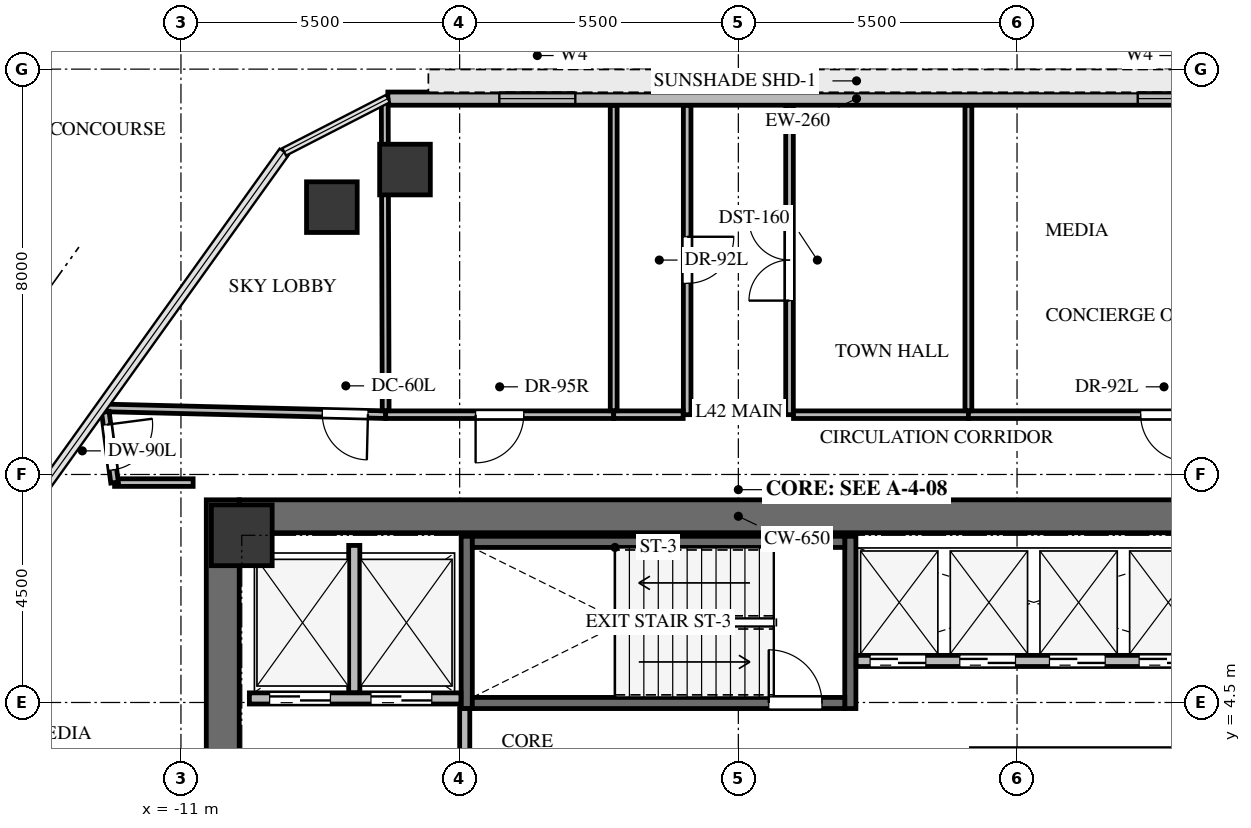
"""IFC4 building model, lengths in metres.
Left out: names, types, materials, properties, quantities, classifications, styles, units other than length and angle.
Written with IfcOpenShell. Run it as: python <this file> out.ifc"""

import sys

from ifc_helpers import new_model, si_unit, direction, frame, frame_2d, origin, origin_2d, place, context, subcontext, project, spatial, rectangle, extrude, source, transform, mapped, element, fill, save


model = new_model("IFC4")
c1 = context("Model", 3, precision=1e-05, world=origin(), true_north=direction((0.0, 1.0)))
c2 = subcontext(c1, "Body", "Model", "MODEL_VIEW")
j1 = project(units=[si_unit("LENGTHUNIT", "METRE"), si_unit("PLANEANGLEUNIT", "RADIAN")], contexts=[c1])
p1 = place(None, origin())
s1 = spatial("IfcSite", under=j1, at=p1, CompositionType="ELEMENT")
p2 = place(p1, origin())
s2 = spatial("IfcBuilding", under=s1, at=p2, CompositionType="ELEMENT")
p3 = place(p2, frame((0.0, 0.0, 155.1)))
s3 = spatial("IfcBuildingStorey", under=s2, at=p3, CompositionType="ELEMENT", Elevation=155.1)
p4 = place(p3, frame((-10.175, -8.5, 0.0), z_axis=(0.0, 0.0, 1.0), x_axis=(0.0, 1.0, 0.0)))
e1 = element("IfcWall", 1, at=p4, inside=s3, PredefinedType="SHEAR", context=c2, shape_type="SweptSolid", body=[
    extrude(rectangle(XDim=17.0, YDim=0.65, at=frame_2d((8.5, 0.0))), origin(), (0.0, 0.0, 1.0), 4.2),
])
p5 = place(p3, frame((-9.85, 8.175, 0.0), z_axis=(0.0, 0.0, 1.0), x_axis=(1.0, 0.0, 0.0)))
e2 = element("IfcWall", 2, at=p5, inside=s3, PredefinedType="SHEAR", context=c2, shape_type="SweptSolid", body=[
    extrude(rectangle(XDim=19.7, YDim=0.65, at=frame_2d((9.85, 0.0))), origin(), (0.0, 0.0, 1.0), 4.2),
])
for number, where, z_axis, x_axis in (
    (3, (2.21, 4.38, -0.32), (0.0, 0.0, 1.0), (0.0, 1.0, 0.0)),
    (4, (-5.36, 7.78, -0.32), (0.0, 0.0, 1.0), (0.0, -1.0, 0.0)),
):
    element("IfcWall", number, at=place(p3, frame(where, z_axis=z_axis, x_axis=x_axis)), inside=s3, PredefinedType="SHEAR", context=c2, shape_type="SweptSolid", body=[
        extrude(rectangle(XDim=3.4, YDim=0.22, at=frame_2d((1.7, 0.0))), origin(), (0.0, 0.0, 1.0), 4.28),
    ])
p6 = place(p3, frame((-5.25, 4.49, -0.32), z_axis=(0.0, 0.0, 1.0), x_axis=(1.0, 0.0, 0.0)))
e5 = element("IfcWall", 5, at=p6, inside=s3, PredefinedType="SHEAR", context=c2, shape_type="SweptSolid", body=[
    extrude(rectangle(XDim=7.35, YDim=0.22, at=frame_2d((3.675, 0.0))), origin(), (0.0, 0.0, 1.0), 4.28),
])
p7 = place(p6, frame((5.85, 0.0, 0.0)))
e6 = element("IfcOpeningElement", 6, at=p7, cuts=e5, PredefinedType="OPENING", context=c2, shape_type="SweptSolid", body=[
    extrude(rectangle(XDim=1.05, YDim=2.15, at=frame_2d((0.525, 1.075))), frame((0.0, 0.12, 0.0), z_axis=(0.0, -1.0, 0.0), x_axis=(1.0, 0.0, 0.0)), (0.0, 0.0, 1.0), 0.24),
])
p8 = place(p3, frame((2.1, 7.67, -0.32), z_axis=(0.0, 0.0, 1.0), x_axis=(-1.0, 0.0, 0.0)))
e7 = element("IfcWall", 7, at=p8, inside=s3, PredefinedType="SHEAR", context=c2, shape_type="SweptSolid", body=[
    extrude(rectangle(XDim=7.35, YDim=0.22, at=frame_2d((3.675, 0.0))), origin(), (0.0, 0.0, 1.0), 4.28),
])
m1 = source(origin(), c2, "Body", "SweptSolid", [
    extrude(rectangle(XDim=1.2, YDim=1.2, at=origin_2d()), origin(), (0.0, 0.0, 1.0), 4.28),
])
p9 = place(p3, frame((-9.8, 7.8, -0.32), z_axis=(0.0, 0.0, 1.0), x_axis=(1.0, 0.0, 0.0)))
e8 = element("IfcColumn", 8, at=p9, inside=s3, PredefinedType="COLUMN", context=c2, shape_type="MappedRepresentation", body=[
    mapped(m1, transform((0.0, 0.0, 0.0), x_axis=(1.0, 0.0, 0.0), y_axis=(0.0, 1.0, 0.0), z_axis=(0.0, 0.0, 1.0), scale=1.0)),
])
m2 = source(origin(), c2, "Body", "SweptSolid", [
    extrude(rectangle(XDim=1.0, YDim=1.0, at=origin_2d()), origin(), (0.0, 0.0, 1.0), 4.28),
])
for number, where, z_axis, x_axis in (
    (9, (-8.022, 14.276, -0.32), (0.0, 0.0, 1.0), (1.0, 0.0, 0.0)),
    (10, (-6.579, 15.018, -0.32), (0.0, 0.0, 1.0), (1.0, 0.0, 0.0)),
):
    element("IfcColumn", number, at=place(p3, frame(where, z_axis=z_axis, x_axis=x_axis)), inside=s3, PredefinedType="COLUMN", context=c2, shape_type="MappedRepresentation", body=[
        mapped(m2, transform((0.0, 0.0, 0.0), x_axis=(1.0, 0.0, 0.0), y_axis=(0.0, 1.0, 0.0), z_axis=(0.0, 0.0, 1.0), scale=1.0)),
    ])
p10 = place(p3, frame((-6.917, 16.418, 0.0), z_axis=(0.0, 0.0, 1.0), x_axis=(1.0, 0.0, 0.0)))
e11 = element("IfcWall", 11, at=p10, inside=s3, PredefinedType="SOLIDWALL", context=c2, shape_type="SweptSolid", body=[
    extrude(rectangle(XDim=18.499, YDim=0.26, at=frame_2d((9.249, 0.0))), origin(), (0.0, 0.0, 1.0), 3.96),
])
p11 = place(p10, frame((2.2, 0.0, 0.9)))
e12 = element("IfcOpeningElement", 12, at=p11, cuts=e11, PredefinedType="OPENING", context=c2, shape_type="SweptSolid", body=[
    extrude(rectangle(XDim=1.5, YDim=1.6, at=frame_2d((0.75, 0.8))), frame((0.0, 0.14, 0.0), z_axis=(0.0, -1.0, 0.0), x_axis=(1.0, 0.0, 0.0)), (0.0, 0.0, 1.0), 0.28),
])
p12 = place(p10, frame((14.799, 0.0, 0.9)))
e13 = element("IfcOpeningElement", 13, at=p12, cuts=e11, PredefinedType="OPENING", context=c2, shape_type="SweptSolid", body=[
    extrude(rectangle(XDim=1.5, YDim=1.6, at=frame_2d((0.75, 0.8))), frame((0.0, 0.14, 0.0), z_axis=(0.0, -1.0, 0.0), x_axis=(1.0, 0.0, 0.0)), (0.0, 0.0, 1.0), 0.28),
])
p13 = place(p3, frame((-9.65, 4.58, 0.0), z_axis=(0.0, 0.0, 1.0), x_axis=(1.0, 0.0, 0.0)))
e14 = element("IfcWall", 14, at=p13, inside=s3, PredefinedType="SOLIDWALL", context=c2, shape_type="SweptSolid", body=[
    extrude(rectangle(XDim=4.175, YDim=0.22, at=frame_2d((2.087, 0.0))), origin(), (0.0, 0.0, 1.0), 3.945),
])
p14 = place(p13, frame((0.4, 0.0, 0.0)))
e15 = element("IfcOpeningElement", 15, at=p14, cuts=e14, PredefinedType="OPENING", context=c2, shape_type="SweptSolid", body=[
    extrude(rectangle(XDim=1.2, YDim=2.15, at=frame_2d((0.6, 1.075))), frame((0.0, 0.12, 0.0), z_axis=(0.0, -1.0, 0.0), x_axis=(1.0, 0.0, 0.0)), (0.0, 0.0, 1.0), 0.24),
])
p15 = place(p13, frame((2.4, 0.0, 0.0)))
e16 = element("IfcOpeningElement", 16, at=p15, cuts=e14, PredefinedType="OPENING", context=c2, shape_type="SweptSolid", body=[
    extrude(rectangle(XDim=1.2, YDim=2.15, at=frame_2d((0.6, 1.075))), frame((0.0, 0.12, 0.0), z_axis=(0.0, -1.0, 0.0), x_axis=(1.0, 0.0, 0.0)), (0.0, 0.0, 1.0), 0.24),
])
p16 = place(p3, frame((-7.58, 4.694, 0.0), z_axis=(0.0, 0.0, 1.0), x_axis=(0.0, 1.0, 0.0)))
e17 = element("IfcWall", 17, at=p16, inside=s3, PredefinedType="SOLIDWALL", context=c2, shape_type="SweptSolid", body=[
    extrude(rectangle(XDim=2.906, YDim=0.22, at=frame_2d((1.453, 0.0))), origin(), (0.0, 0.0, 1.0), 3.945),
])
p17 = place(p3, frame((-5.4, 0.354, 0.0), z_axis=(0.0, 0.0, 1.0), x_axis=(0.0, 1.0, 0.0)))
e18 = element("IfcWall", 18, at=p17, inside=s3, PredefinedType="SOLIDWALL", context=c2, shape_type="SweptSolid", body=[
    extrude(rectangle(XDim=4.026, YDim=0.2, at=frame_2d((2.013, 0.0))), origin(), (0.0, 0.0, 1.0), 3.945),
])
p18 = place(p17, frame((0.246, 0.0, 0.0)))
e19 = element("IfcOpeningElement", 19, at=p18, cuts=e18, PredefinedType="OPENING", context=c2, shape_type="SweptSolid", body=[
    extrude(rectangle(XDim=1.0, YDim=2.15, at=frame_2d((0.5, 1.075))), frame((0.0, 0.11, 0.0), z_axis=(0.0, -1.0, 0.0), x_axis=(1.0, 0.0, 0.0)), (0.0, 0.0, 1.0), 0.22),
])
p19 = place(p3, frame((2.325, 5.32, 0.0), z_axis=(0.0, 0.0, 1.0), x_axis=(1.0, 0.0, 0.0)))
e20 = element("IfcWall", 20, at=p19, inside=s3, PredefinedType="SOLIDWALL", context=c2, shape_type="SweptSolid", body=[
    extrude(rectangle(XDim=7.325, YDim=0.22, at=frame_2d((3.663, 0.0))), origin(), (0.0, 0.0, 1.0), 3.945),
])
p20 = place(p19, frame((0.275, 0.0, 0.0)))
e21 = element("IfcOpeningElement", 21, at=p20, cuts=e20, PredefinedType="OPENING", context=c2, shape_type="SweptSolid", body=[
    extrude(rectangle(XDim=1.1, YDim=2.15, at=frame_2d((0.55, 1.075))), frame((0.0, 0.12, 0.0), z_axis=(0.0, -1.0, 0.0), x_axis=(1.0, 0.0, 0.0)), (0.0, 0.0, 1.0), 0.24),
])
p21 = place(p19, frame((2.045, 0.0, 0.0)))
e22 = element("IfcOpeningElement", 22, at=p21, cuts=e20, PredefinedType="OPENING", context=c2, shape_type="SweptSolid", body=[
    extrude(rectangle(XDim=1.1, YDim=2.15, at=frame_2d((0.55, 1.075))), frame((0.0, 0.12, 0.0), z_axis=(0.0, -1.0, 0.0), x_axis=(1.0, 0.0, 0.0)), (0.0, 0.0, 1.0), 0.24),
])
p22 = place(p19, frame((3.815, 0.0, 0.0)))
e23 = element("IfcOpeningElement", 23, at=p22, cuts=e20, PredefinedType="OPENING", context=c2, shape_type="SweptSolid", body=[
    extrude(rectangle(XDim=1.1, YDim=2.15, at=frame_2d((0.55, 1.075))), frame((0.0, 0.12, 0.0), z_axis=(0.0, -1.0, 0.0), x_axis=(1.0, 0.0, 0.0)), (0.0, 0.0, 1.0), 0.24),
])
p23 = place(p19, frame((5.585, 0.0, 0.0)))
e24 = element("IfcOpeningElement", 24, at=p23, cuts=e20, PredefinedType="OPENING", context=c2, shape_type="SweptSolid", body=[
    extrude(rectangle(XDim=1.1, YDim=2.15, at=frame_2d((0.55, 1.075))), frame((0.0, 0.12, 0.0), z_axis=(0.0, -1.0, 0.0), x_axis=(1.0, 0.0, 0.0)), (0.0, 0.0, 1.0), 0.24),
])
p24 = place(p3, frame((-6.96, 10.18, 0.0), z_axis=(0.0, 0.0, 1.0), x_axis=(-0.999708370039, 0.024149013935, 0.0)))
e25 = element("IfcWall", 25, at=p24, inside=s3, PredefinedType="PARTITIONING", context=c2, shape_type="SweptSolid", body=[
    extrude(rectangle(XDim=5.621, YDim=0.15, at=frame_2d((2.811, 0.0))), origin(), (0.0, 0.0, 1.0), 3.142),
])
p25 = place(p24, frame((0.35, 0.0, 0.0)))
e26 = element("IfcOpeningElement", 26, at=p25, cuts=e25, PredefinedType="OPENING", context=c2, shape_type="SweptSolid", body=[
    extrude(rectangle(XDim=0.9, YDim=2.05, at=frame_2d((0.45, 1.025))), frame((0.0, 0.085, 0.0), z_axis=(0.0, -1.0, 0.0), x_axis=(1.0, 0.0, 0.0)), (0.0, 0.0, 1.0), 0.17),
])
p26 = place(p3, frame((-2.46, 10.18, 0.0), z_axis=(0.0, 0.0, 1.0), x_axis=(-1.0, 0.0, 0.0)))
e27 = element("IfcWall", 27, at=p26, inside=s3, PredefinedType="PARTITIONING", context=c2, shape_type="SweptSolid", body=[
    extrude(rectangle(XDim=4.5, YDim=0.15, at=frame_2d((2.25, 0.0))), origin(), (0.0, 0.0, 1.0), 3.142),
])
p27 = place(p26, frame((1.775, 0.0, 0.0)))
e28 = element("IfcOpeningElement", 28, at=p27, cuts=e27, PredefinedType="OPENING", context=c2, shape_type="SweptSolid", body=[
    extrude(rectangle(XDim=0.95, YDim=2.1, at=frame_2d((0.475, 1.05))), frame((0.0, 0.085, 0.0), z_axis=(0.0, -1.0, 0.0), x_axis=(1.0, 0.0, 0.0)), (0.0, 0.0, 1.0), 0.17),
])
p28 = place(p3, frame((-1.01, 16.283, 0.0), z_axis=(0.0, 0.0, 1.0), x_axis=(0.0, -1.0, 0.0)))
e29 = element("IfcWall", 29, at=p28, inside=s3, PredefinedType="PARTITIONING", context=c2, shape_type="SweptSolid", body=[
    extrude(rectangle(XDim=6.103, YDim=0.15, at=frame_2d((3.052, 0.0))), origin(), (0.0, 0.0, 1.0), 3.299),
])
p29 = place(p28, frame((2.592, 0.0, 0.0)))
e30 = element("IfcOpeningElement", 30, at=p29, cuts=e29, PredefinedType="OPENING", context=c2, shape_type="SweptSolid", body=[
    extrude(rectangle(XDim=0.92, YDim=2.1, at=frame_2d((0.46, 1.05))), frame((0.0, 0.085, 0.0), z_axis=(0.0, -1.0, 0.0), x_axis=(1.0, 0.0, 0.0)), (0.0, 0.0, 1.0), 0.17),
])
p30 = place(p3, frame((-1.089, 10.18, 0.0), z_axis=(0.0, 0.0, 1.0), x_axis=(-1.0, 0.0, 0.0)))
e31 = element("IfcWall", 31, at=p30, inside=s3, PredefinedType="PARTITIONING", context=c2, shape_type="SweptSolid", body=[
    extrude(rectangle(XDim=1.371, YDim=0.15, at=frame_2d((0.686, 0.0))), origin(), (0.0, 0.0, 1.0), 3.508),
])
p31 = place(p3, frame((1.01, 10.18, 0.0), z_axis=(0.0, 0.0, 1.0), x_axis=(0.0, 1.0, 0.0)))
e32 = element("IfcWall", 32, at=p31, inside=s3, PredefinedType="PARTITIONING", context=c2, shape_type="SweptSolid", body=[
    extrude(rectangle(XDim=6.103, YDim=0.15, at=frame_2d((3.052, 0.0))), origin(), (0.0, 0.0, 1.0), 3.299),
])
p32 = place(p31, frame((2.251, 0.0, 0.0)))
e33 = element("IfcOpeningElement", 33, at=p32, cuts=e32, PredefinedType="OPENING", context=c2, shape_type="SweptSolid", body=[
    extrude(rectangle(XDim=1.6, YDim=2.15, at=frame_2d((0.8, 1.075))), frame((0.0, 0.085, 0.0), z_axis=(0.0, -1.0, 0.0), x_axis=(1.0, 0.0, 0.0)), (0.0, 0.0, 1.0), 0.17),
])
p33 = place(p3, frame((4.54, 10.18, 0.0), z_axis=(0.0, 0.0, 1.0), x_axis=(-1.0, 0.0, 0.0)))
e34 = element("IfcWall", 34, at=p33, inside=s3, PredefinedType="PARTITIONING", context=c2, shape_type="SweptSolid", body=[
    extrude(rectangle(XDim=3.451, YDim=0.15, at=frame_2d((1.726, 0.0))), origin(), (0.0, 0.0, 1.0), 3.508),
])
p34 = place(p3, frame((12.26, 10.18, 0.0), z_axis=(0.0, 0.0, 1.0), x_axis=(-1.0, 0.0, 0.0)))
e35 = element("IfcWall", 35, at=p34, inside=s3, PredefinedType="PARTITIONING", context=c2, shape_type="SweptSolid", body=[
    extrude(rectangle(XDim=7.72, YDim=0.15, at=frame_2d((3.86, 0.0))), origin(), (0.0, 0.0, 1.0), 3.142),
])
p35 = place(p34, frame((3.4, 0.0, 0.0)))
e36 = element("IfcOpeningElement", 36, at=p35, cuts=e35, PredefinedType="OPENING", context=c2, shape_type="SweptSolid", body=[
    extrude(rectangle(XDim=0.92, YDim=2.1, at=frame_2d((0.46, 1.05))), frame((0.0, 0.085, 0.0), z_axis=(0.0, -1.0, 0.0), x_axis=(1.0, 0.0, 0.0)), (0.0, 0.0, 1.0), 0.17),
])
p36 = place(p3, frame((-12.31, 8.84, 0.0), z_axis=(0.0, 0.0, 1.0), x_axis=(1.0, 0.0, 0.0)))
e37 = element("IfcWall", 37, at=p36, inside=s3, PredefinedType="PARTITIONING", context=c2, shape_type="SweptSolid", body=[
    extrude(rectangle(XDim=1.55, YDim=0.15, at=frame_2d((0.775, 0.0))), origin(), (0.0, 0.0, 1.0), 3.299),
])
p37 = place(p3, frame((-12.492, 10.235, 0.0), z_axis=(0.0, 0.0, 1.0), x_axis=(0.129331762516, -0.991601379186, 0.0)))
e38 = element("IfcWall", 38, at=p37, inside=s3, PredefinedType="PARTITIONING", context=c2, shape_type="SweptSolid", body=[
    extrude(rectangle(XDim=1.406, YDim=0.15, at=frame_2d((0.703, 0.0))), origin(), (0.0, 0.0, 1.0), 3.945),
])
p38 = place(p37, frame((0.253, 0.0, 0.0)))
e39 = element("IfcOpeningElement", 39, at=p38, cuts=e38, PredefinedType="OPENING", context=c2, shape_type="SweptSolid", body=[
    extrude(rectangle(XDim=0.9, YDim=2.05, at=frame_2d((0.45, 1.025))), frame((0.0, 0.085, 0.0), z_axis=(0.0, -1.0, 0.0), x_axis=(1.0, 0.0, 0.0)), (0.0, 0.0, 1.0), 0.17),
])
p39 = place(p3, frame((-6.978, 16.387, 0.0), z_axis=(0.0, 0.0, 1.0), x_axis=(0.00294831182, -0.999995653719, 0.0)))
e40 = element("IfcWall", 40, at=p39, inside=s3, PredefinedType="PARTITIONING", context=c2, shape_type="SweptSolid", body=[
    extrude(rectangle(XDim=6.128, YDim=0.135, at=frame_2d((3.064, 0.0))), origin(), (0.0, 0.0, 1.0), 3.142),
])
for number, where, z_axis, x_axis in (
    (41, (-2.46, 16.283, 0.0), (0.0, 0.0, 1.0), (0.0, -1.0, 0.0)),
    (42, (4.54, 16.283, 0.0), (0.0, 0.0, 1.0), (0.0, -1.0, 0.0)),
):
    element("IfcWall", number, at=place(p3, frame(where, z_axis=z_axis, x_axis=x_axis)), inside=s3, PredefinedType="PARTITIONING", context=c2, shape_type="SweptSolid", body=[
        extrude(rectangle(XDim=6.024, YDim=0.135, at=frame_2d((3.012, 0.0))), origin(), (0.0, 0.0, 1.0), 3.299),
    ])
m3 = source(origin(), c2, "Body", "SweptSolid", [
    extrude(rectangle(XDim=1.5, YDim=1.6, at=frame_2d((0.75, 0.8))), frame((0.0, 0.03, 0.0), z_axis=(0.0, -1.0, 0.0), x_axis=(1.0, 0.0, 0.0)), (0.0, 0.0, 1.0), 0.06),
])
p40 = place(p11, origin())
e43 = element("IfcWindow", 43, at=p40, inside=s3, PartitioningType="SINGLE_PANEL", PredefinedType="WINDOW", context=c2, shape_type="MappedRepresentation", body=[
    mapped(m3, transform((0.0, 0.0, 0.0), x_axis=(1.0, 0.0, 0.0), y_axis=(0.0, 1.0, 0.0), z_axis=(0.0, 0.0, 1.0), scale=1.0)),
])
fill(e12, e43)
p41 = place(p12, origin())
e44 = element("IfcWindow", 44, at=p41, inside=s3, PartitioningType="SINGLE_PANEL", PredefinedType="WINDOW", context=c2, shape_type="MappedRepresentation", body=[
    mapped(m3, transform((0.0, 0.0, 0.0), x_axis=(1.0, 0.0, 0.0), y_axis=(0.0, 1.0, 0.0), z_axis=(0.0, 0.0, 1.0), scale=1.0)),
])
fill(e13, e44)
m4 = source(origin(), c2, "Body", "SweptSolid", [
    extrude(rectangle(XDim=1.05, YDim=2.15, at=frame_2d((0.525, 1.075))), frame((0.0, 0.025, 0.0), z_axis=(0.0, -1.0, 0.0), x_axis=(1.0, 0.0, 0.0)), (0.0, 0.0, 1.0), 0.05),
])
p42 = place(p7, origin())
e45 = element("IfcDoor", 45, at=p42, inside=s3, OperationType="SINGLE_SWING_LEFT", PredefinedType="DOOR", context=c2, shape_type="MappedRepresentation", body=[
    mapped(m4, transform((0.0, 0.0, 0.0), x_axis=(1.0, 0.0, 0.0), y_axis=(0.0, 1.0, 0.0), z_axis=(0.0, 0.0, 1.0), scale=1.0)),
])
fill(e6, e45)
m5 = source(origin(), c2, "Body", "SweptSolid", [
    extrude(rectangle(XDim=1.2, YDim=2.15, at=frame_2d((0.6, 1.075))), frame((0.0, 0.025, 0.0), z_axis=(0.0, -1.0, 0.0), x_axis=(1.0, 0.0, 0.0)), (0.0, 0.0, 1.0), 0.05),
])
p43 = place(p14, origin())
e46 = element("IfcDoor", 46, at=p43, inside=s3, OperationType="DOUBLE_DOOR_SLIDING", PredefinedType="DOOR", context=c2, shape_type="MappedRepresentation", body=[
    mapped(m5, transform((0.0, 0.0, 0.0), x_axis=(1.0, 0.0, 0.0), y_axis=(0.0, 1.0, 0.0), z_axis=(0.0, 0.0, 1.0), scale=1.0)),
])
fill(e15, e46)
p44 = place(p15, origin())
e47 = element("IfcDoor", 47, at=p44, inside=s3, OperationType="DOUBLE_DOOR_SLIDING", PredefinedType="DOOR", context=c2, shape_type="MappedRepresentation", body=[
    mapped(m5, transform((0.0, 0.0, 0.0), x_axis=(1.0, 0.0, 0.0), y_axis=(0.0, 1.0, 0.0), z_axis=(0.0, 0.0, 1.0), scale=1.0)),
])
fill(e16, e47)
m6 = source(origin(), c2, "Body", "SweptSolid", [
    extrude(rectangle(XDim=1.1, YDim=2.15, at=frame_2d((0.55, 1.075))), frame((0.0, 0.025, 0.0), z_axis=(0.0, -1.0, 0.0), x_axis=(1.0, 0.0, 0.0)), (0.0, 0.0, 1.0), 0.05),
])
p45 = place(p20, origin())
e48 = element("IfcDoor", 48, at=p45, inside=s3, OperationType="DOUBLE_DOOR_SLIDING", PredefinedType="DOOR", context=c2, shape_type="MappedRepresentation", body=[
    mapped(m6, transform((0.0, 0.0, 0.0), x_axis=(1.0, 0.0, 0.0), y_axis=(0.0, 1.0, 0.0), z_axis=(0.0, 0.0, 1.0), scale=1.0)),
])
fill(e21, e48)
p46 = place(p21, origin())
e49 = element("IfcDoor", 49, at=p46, inside=s3, OperationType="DOUBLE_DOOR_SLIDING", PredefinedType="DOOR", context=c2, shape_type="MappedRepresentation", body=[
    mapped(m6, transform((0.0, 0.0, 0.0), x_axis=(1.0, 0.0, 0.0), y_axis=(0.0, 1.0, 0.0), z_axis=(0.0, 0.0, 1.0), scale=1.0)),
])
fill(e22, e49)
p47 = place(p22, origin())
e50 = element("IfcDoor", 50, at=p47, inside=s3, OperationType="DOUBLE_DOOR_SLIDING", PredefinedType="DOOR", context=c2, shape_type="MappedRepresentation", body=[
    mapped(m6, transform((0.0, 0.0, 0.0), x_axis=(1.0, 0.0, 0.0), y_axis=(0.0, 1.0, 0.0), z_axis=(0.0, 0.0, 1.0), scale=1.0)),
])
fill(e23, e50)
p48 = place(p23, origin())
e51 = element("IfcDoor", 51, at=p48, inside=s3, OperationType="DOUBLE_DOOR_SLIDING", PredefinedType="DOOR", context=c2, shape_type="MappedRepresentation", body=[
    mapped(m6, transform((0.0, 0.0, 0.0), x_axis=(1.0, 0.0, 0.0), y_axis=(0.0, 1.0, 0.0), z_axis=(0.0, 0.0, 1.0), scale=1.0)),
])
fill(e24, e51)
m7 = source(origin(), c2, "Body", "SweptSolid", [
    extrude(rectangle(XDim=0.9, YDim=2.05, at=frame_2d((0.45, 1.025))), frame((0.0, 0.025, 0.0), z_axis=(0.0, -1.0, 0.0), x_axis=(1.0, 0.0, 0.0)), (0.0, 0.0, 1.0), 0.05),
])
p49 = place(p25, origin())
e52 = element("IfcDoor", 52, at=p49, inside=s3, OperationType="SINGLE_SWING_LEFT", PredefinedType="DOOR", context=c2, shape_type="MappedRepresentation", body=[
    mapped(m7, transform((0.0, 0.0, 0.0), x_axis=(1.0, 0.0, 0.0), y_axis=(0.0, 1.0, 0.0), z_axis=(0.0, 0.0, 1.0), scale=1.0)),
])
fill(e26, e52)
m8 = source(origin(), c2, "Body", "SweptSolid", [
    extrude(rectangle(XDim=0.95, YDim=2.1, at=frame_2d((0.475, 1.05))), frame((0.0, 0.025, 0.0), z_axis=(0.0, -1.0, 0.0), x_axis=(1.0, 0.0, 0.0)), (0.0, 0.0, 1.0), 0.05),
])
p50 = place(p27, origin())
e53 = element("IfcDoor", 53, at=p50, inside=s3, OperationType="SINGLE_SWING_RIGHT", PredefinedType="DOOR", context=c2, shape_type="MappedRepresentation", body=[
    mapped(m8, transform((0.0, 0.0, 0.0), x_axis=(1.0, 0.0, 0.0), y_axis=(0.0, 1.0, 0.0), z_axis=(0.0, 0.0, 1.0), scale=1.0)),
])
fill(e28, e53)
m9 = source(origin(), c2, "Body", "SweptSolid", [
    extrude(rectangle(XDim=0.92, YDim=2.1, at=frame_2d((0.46, 1.05))), frame((0.0, 0.025, 0.0), z_axis=(0.0, -1.0, 0.0), x_axis=(1.0, 0.0, 0.0)), (0.0, 0.0, 1.0), 0.05),
])
p51 = place(p29, origin())
e54 = element("IfcDoor", 54, at=p51, inside=s3, OperationType="SINGLE_SWING_LEFT", PredefinedType="DOOR", context=c2, shape_type="MappedRepresentation", body=[
    mapped(m9, transform((0.0, 0.0, 0.0), x_axis=(1.0, 0.0, 0.0), y_axis=(0.0, 1.0, 0.0), z_axis=(0.0, 0.0, 1.0), scale=1.0)),
])
fill(e30, e54)
m10 = source(origin(), c2, "Body", "SweptSolid", [
    extrude(rectangle(XDim=1.6, YDim=2.15, at=frame_2d((0.8, 1.075))), frame((0.0, 0.025, 0.0), z_axis=(0.0, -1.0, 0.0), x_axis=(1.0, 0.0, 0.0)), (0.0, 0.0, 1.0), 0.05),
])
p52 = place(p32, origin())
e55 = element("IfcDoor", 55, at=p52, inside=s3, OperationType="DOUBLE_DOOR_SINGLE_SWING", PredefinedType="DOOR", context=c2, shape_type="MappedRepresentation", body=[
    mapped(m10, transform((0.0, 0.0, 0.0), x_axis=(1.0, 0.0, 0.0), y_axis=(0.0, 1.0, 0.0), z_axis=(0.0, 0.0, 1.0), scale=1.0)),
])
fill(e33, e55)
p53 = place(p35, origin())
e56 = element("IfcDoor", 56, at=p53, inside=s3, OperationType="SINGLE_SWING_LEFT", PredefinedType="DOOR", context=c2, shape_type="MappedRepresentation", body=[
    mapped(m9, transform((0.0, 0.0, 0.0), x_axis=(1.0, 0.0, 0.0), y_axis=(0.0, 1.0, 0.0), z_axis=(0.0, 0.0, 1.0), scale=1.0)),
])
fill(e36, e56)
m11 = source(origin(), c2, "Body", "SweptSolid", [
    extrude(rectangle(XDim=0.9, YDim=2.05, at=frame_2d((0.45, 1.025))), frame((0.0, 0.025, 0.0), z_axis=(0.0, -1.0, 0.0), x_axis=(1.0, 0.0, 0.0)), (0.0, 0.0, 1.0), 0.05),
])
p54 = place(p38, origin())
e57 = element("IfcDoor", 57, at=p54, inside=s3, OperationType="SINGLE_SWING_LEFT", PredefinedType="DOOR", context=c2, shape_type="MappedRepresentation", body=[
    mapped(m11, transform((0.0, 0.0, 0.0), x_axis=(1.0, 0.0, 0.0), y_axis=(0.0, 1.0, 0.0), z_axis=(0.0, 0.0, 1.0), scale=1.0)),
])
fill(e39, e57)
save(model, sys.argv[1])
